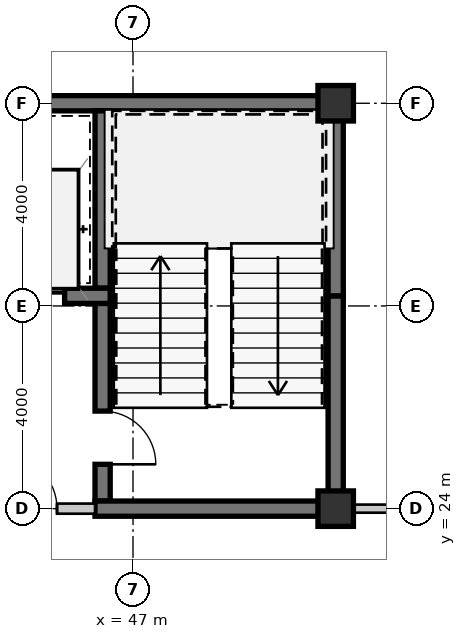
"""IFC4 building model, lengths in metres.
Left out: names, types, materials, properties, quantities, classifications, styles, units other than length and angle.
Written with IfcOpenShell. Run it as: python <this file> out.ifc"""

import sys

from ifc_helpers import new_model, si_unit, direction, frame, frame_2d, origin, origin_2d, place, context, subcontext, project, spatial, rectangle, extrude, source, transform, mapped, element, fill, save


model = new_model("IFC4")
c1 = context("Model", 3, precision=1e-05, world=origin(), true_north=direction((0.0, 1.0)))
c2 = subcontext(c1, "Body", "Model", "MODEL_VIEW")
j1 = project(units=[si_unit("LENGTHUNIT", "METRE"), si_unit("PLANEANGLEUNIT", "RADIAN")], contexts=[c1])
p1 = place(None, origin())
s1 = spatial("IfcSite", under=j1, at=p1, CompositionType="ELEMENT")
p2 = place(p1, origin())
s2 = spatial("IfcBuilding", under=s1, at=p2, CompositionType="ELEMENT")
p3 = place(p2, frame((0.0, 0.0, 93.45)))
s3 = spatial("IfcBuildingStorey", under=s2, at=p3, CompositionType="ELEMENT", Elevation=93.45)
m1 = source(origin(), c2, "Body", "SweptSolid", [
    extrude(rectangle(XDim=0.7, YDim=0.7, at=origin_2d()), origin(), (0.0, 0.0, 1.0), 3.15),
])
for number, where, z_axis, x_axis in (
    (1, (51.0, 24.0, 0.0), (0.0, 0.0, 1.0), (1.0, 0.0, 0.0)),
    (2, (51.0, 32.0, 0.0), (0.0, 0.0, 1.0), (1.0, 0.0, 0.0)),
):
    element("IfcColumn", number, at=place(p3, frame(where, z_axis=z_axis, x_axis=x_axis)), inside=s3, PredefinedType="COLUMN", context=c2, shape_type="MappedRepresentation", body=[
        mapped(m1, transform((0.0, 0.0, 0.0), scale=1.0)),
    ])
m2 = source(origin(), c2, "Body", "SweptSolid", [
    extrude(rectangle(XDim=11.95, YDim=0.3, at=frame_2d((5.975, 0.0))), origin(), (0.0, 0.0, 1.0), 2.93),
])
p4 = place(p3, frame((39.2, 32.0, 0.0), z_axis=(0.0, 0.0, 1.0), x_axis=(1.0, 0.0, 0.0)))
e3 = element("IfcWall", 3, at=p4, inside=s3, PredefinedType="SHEAR", context=c2, shape_type="MappedRepresentation", body=[
    mapped(m2, transform((0.0, 0.0, 0.0), scale=1.0)),
])
m3 = source(origin(), c2, "Body", "SweptSolid", [
    extrude(rectangle(XDim=4.05, YDim=0.3, at=frame_2d((2.025, 0.0))), origin(), (0.0, 0.0, 1.0), 2.93),
])
p5 = place(p3, frame((51.0, 24.15, 0.0), z_axis=(0.0, 0.0, 1.0), x_axis=(0.0, 1.0, 0.0)))
e4 = element("IfcWall", 4, at=p5, inside=s3, PredefinedType="SHEAR", context=c2, shape_type="MappedRepresentation", body=[
    mapped(m3, transform((0.0, 0.0, 0.0), scale=1.0)),
])
m4 = source(origin(), c2, "Body", "SweptSolid", [
    extrude(rectangle(XDim=3.65, YDim=0.3, at=frame_2d((1.825, 0.0))), origin(), (0.0, 0.0, 1.0), 2.93),
])
p6 = place(p3, frame((51.0, 28.2, 0.0), z_axis=(0.0, 0.0, 1.0), x_axis=(0.0, 1.0, 0.0)))
e5 = element("IfcWall", 5, at=p6, inside=s3, PredefinedType="SHEAR", context=c2, shape_type="MappedRepresentation", body=[
    mapped(m4, transform((0.0, 0.0, 0.0), scale=1.0)),
])
m5 = source(origin(), c2, "Body", "SweptSolid", [
    extrude(rectangle(XDim=3.5, YDim=0.3, at=frame_2d((1.75, 0.0))), origin(), (0.0, 0.0, 1.0), 2.93),
])
p7 = place(p3, frame((46.4, 31.85, 0.0), z_axis=(0.0, 0.0, 1.0), x_axis=(0.0, -1.0, 0.0)))
e6 = element("IfcWall", 6, at=p7, inside=s3, PredefinedType="SHEAR", context=c2, shape_type="MappedRepresentation", body=[
    mapped(m5, transform((0.0, 0.0, 0.0), scale=1.0)),
])
m6 = source(origin(), c2, "Body", "SweptSolid", [
    extrude(rectangle(XDim=3.9, YDim=0.3, at=frame_2d((1.95, 0.0))), origin(), (0.0, 0.0, 1.0), 2.93),
])
p8 = place(p3, frame((46.4, 28.05, 0.0), z_axis=(0.0, 0.0, 1.0), x_axis=(0.0, -1.0, 0.0)))
e7 = element("IfcWall", 7, at=p8, inside=s3, PredefinedType="SHEAR", context=c2, shape_type="MappedRepresentation", body=[
    mapped(m6, transform((0.0, 0.0, 0.0), scale=1.0)),
])
m7 = source(origin(), c2, "Body", "SweptSolid", [
    extrude(rectangle(XDim=1.05, YDim=2.1, at=frame_2d((0.525, 1.05))), frame((0.0, 0.16, 0.0), z_axis=(0.0, -1.0, 0.0), x_axis=(1.0, 0.0, 0.0)), (0.0, 0.0, 1.0), 0.32),
])
p9 = place(p8, frame((2.125, 0.0, 0.0)))
e8 = element("IfcOpeningElement", 8, at=p9, cuts=e7, PredefinedType="OPENING", context=c2, shape_type="MappedRepresentation", body=[
    mapped(m7, transform((0.0, 0.0, 0.0), scale=1.0)),
])
m8 = source(origin(), c2, "Body", "SweptSolid", [
    extrude(rectangle(XDim=4.9, YDim=0.3, at=frame_2d((2.45, 0.0))), origin(), (0.0, 0.0, 1.0), 2.93),
])
p10 = place(p3, frame((46.25, 24.0, 0.0), z_axis=(0.0, 0.0, 1.0), x_axis=(1.0, 0.0, 0.0)))
e9 = element("IfcWall", 9, at=p10, inside=s3, PredefinedType="SHEAR", context=c2, shape_type="MappedRepresentation", body=[
    mapped(m8, transform((0.0, 0.0, 0.0), scale=1.0)),
])
m9 = source(origin(), c2, "Body", "SweptSolid", [
    extrude(rectangle(XDim=2.9, YDim=0.3, at=frame_2d((1.45, 0.0))), origin(), (0.0, 0.0, 1.0), 2.93),
])
p11 = place(p3, frame((43.65, 28.2, 0.0), z_axis=(0.0, 0.0, 1.0), x_axis=(1.0, 0.0, 0.0)))
e10 = element("IfcWall", 10, at=p11, inside=s3, PredefinedType="SHEAR", context=c2, shape_type="MappedRepresentation", body=[
    mapped(m9, transform((0.0, 0.0, 0.0), scale=1.0)),
])
m10 = source(origin(), c2, "Body", "SweptSolid", [
    extrude(rectangle(XDim=1.1, YDim=2.15, at=frame_2d((0.55, 1.075))), frame((0.0, 0.16, 0.0), z_axis=(0.0, -1.0, 0.0), x_axis=(1.0, 0.0, 0.0)), (0.0, 0.0, 1.0), 0.32),
])
p12 = place(p11, frame((0.9, 0.0, 0.0)))
e11 = element("IfcOpeningElement", 11, at=p12, cuts=e10, PredefinedType="OPENING", context=c2, shape_type="MappedRepresentation", body=[
    mapped(m10, transform((0.0, 0.0, 0.0), scale=1.0)),
])
m11 = source(origin(), c2, "Body", "SweptSolid", [
    extrude(rectangle(XDim=2.7, YDim=0.2, at=frame_2d((1.35, 0.0))), origin(), (0.0, 0.0, 1.0), 2.397),
])
p13 = place(p3, frame((43.55, 24.0, 0.0), z_axis=(0.0, 0.0, 1.0), x_axis=(1.0, 0.0, 0.0)))
e12 = element("IfcWall", 12, at=p13, inside=s3, PredefinedType="SOLIDWALL", context=c2, shape_type="MappedRepresentation", body=[
    mapped(m11, transform((0.0, 0.0, 0.0), scale=1.0)),
])
m12 = source(origin(), c2, "Body", "SweptSolid", [
    extrude(rectangle(XDim=1.05, YDim=2.1, at=frame_2d((0.525, 1.05))), frame((0.0, 0.11, 0.0), z_axis=(0.0, -1.0, 0.0), x_axis=(1.0, 0.0, 0.0)), (0.0, 0.0, 1.0), 0.22),
])
p14 = place(p13, frame((0.9, 0.0, 0.0)))
e13 = element("IfcOpeningElement", 13, at=p14, cuts=e12, PredefinedType="OPENING", context=c2, shape_type="MappedRepresentation", body=[
    mapped(m12, transform((0.0, 0.0, 0.0), scale=1.0)),
])
m13 = source(origin(), c2, "Body", "SweptSolid", [
    extrude(rectangle(XDim=1.155, YDim=0.16, at=frame_2d((0.577, 0.0))), origin(), (0.0, 0.0, 1.0), 2.328),
])
p15 = place(p3, frame((51.15, 24.0, 0.0), z_axis=(0.0, 0.0, 1.0), x_axis=(1.0, 0.0, 0.0)))
e14 = element("IfcWall", 14, at=p15, inside=s3, PredefinedType="PARTITIONING", context=c2, shape_type="MappedRepresentation", body=[
    mapped(m13, transform((0.0, 0.0, 0.0), scale=1.0)),
])
m14 = source(origin(), c2, "Body", "SweptSolid", [
    extrude(rectangle(XDim=1.05, YDim=2.1, at=frame_2d((0.525, 1.05))), frame((0.0, 0.025, 0.0), z_axis=(0.0, -1.0, 0.0), x_axis=(1.0, 0.0, 0.0)), (0.0, 0.0, 1.0), 0.05),
])
p16 = place(p9, origin())
e15 = element("IfcDoor", 15, at=p16, inside=s3, OperationType="SINGLE_SWING_RIGHT", PredefinedType="DOOR", context=c2, shape_type="MappedRepresentation", body=[
    mapped(m14, transform((0.0, 0.0, 0.0), scale=1.0)),
])
fill(e8, e15)
m15 = source(origin(), c2, "Body", "SweptSolid", [
    extrude(rectangle(XDim=1.1, YDim=2.15, at=frame_2d((0.55, 1.075))), frame((0.0, 0.025, 0.0), z_axis=(0.0, -1.0, 0.0), x_axis=(1.0, 0.0, 0.0)), (0.0, 0.0, 1.0), 0.05),
])
p17 = place(p12, origin())
e16 = element("IfcDoor", 16, at=p17, inside=s3, OperationType="SLIDING_TO_LEFT", PredefinedType="DOOR", context=c2, shape_type="MappedRepresentation", body=[
    mapped(m15, transform((0.0, 0.0, 0.0), scale=1.0)),
])
fill(e11, e16)
p18 = place(p14, origin())
e17 = element("IfcDoor", 17, at=p18, inside=s3, OperationType="SINGLE_SWING_LEFT", PredefinedType="DOOR", context=c2, shape_type="MappedRepresentation", body=[
    mapped(m14, transform((0.0, 0.0, 0.0), scale=1.0)),
])
fill(e13, e17)
save(model, sys.argv[1])
